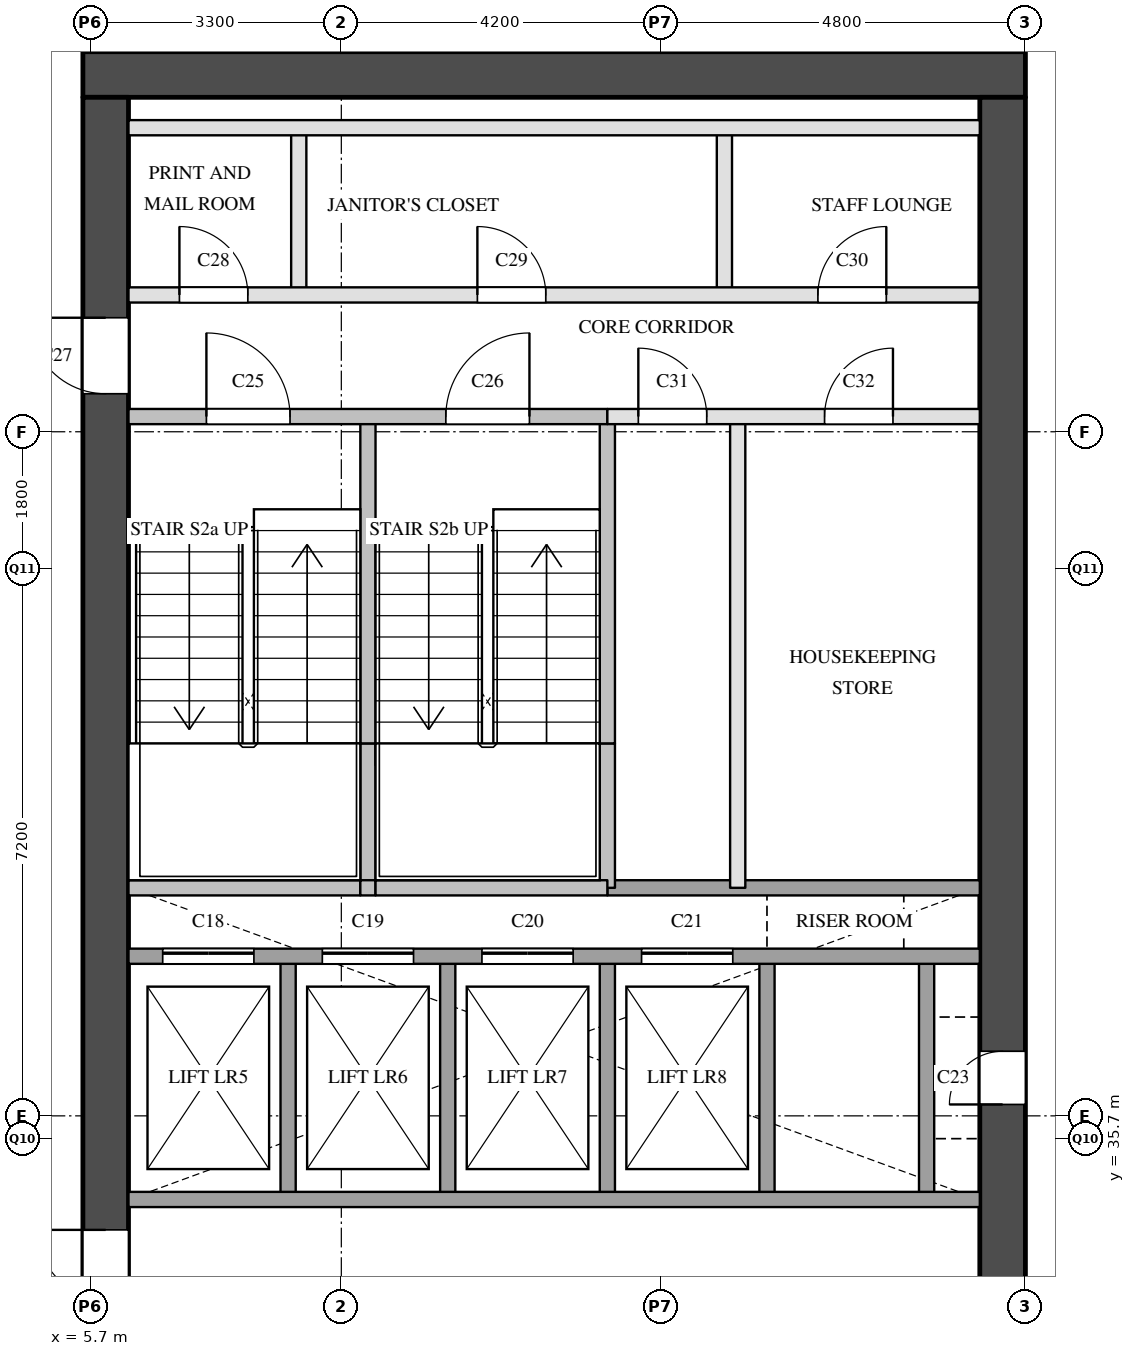
"""IFC4 building model, lengths in metres.
Left out: names, types, materials, properties, quantities, classifications, styles, units other than length and angle.
Written with IfcOpenShell. Run it as: python <this file> out.ifc"""

import sys

from ifc_helpers import new_model, si_unit, direction, frame, frame_2d, origin, place, context, subcontext, project, spatial, rectangle, extrude, element, fill, save


model = new_model("IFC4")
c1 = context("Model", 3, precision=1e-05, world=origin(), true_north=direction((0.0, 1.0)))
c2 = subcontext(c1, "Body", "Model", "MODEL_VIEW")
j1 = project(units=[si_unit("LENGTHUNIT", "METRE"), si_unit("PLANEANGLEUNIT", "RADIAN")], contexts=[c1])
p1 = place(None, origin())
s1 = spatial("IfcSite", under=j1, at=p1, CompositionType="ELEMENT")
p2 = place(p1, origin())
s2 = spatial("IfcBuilding", under=s1, at=p2, CompositionType="ELEMENT")
p3 = place(p2, frame((0.0, 0.0, 42.4)))
s3 = spatial("IfcBuildingStorey", under=s2, at=p3, CompositionType="ELEMENT", Elevation=42.4)
p4 = place(p3, frame((5.6, 49.7, 0.0), z_axis=(0.0, 0.0, 1.0), x_axis=(1.0, 0.0, 0.0)))
e1 = element("IfcWall", 1, at=p4, inside=s3, PredefinedType="SHEAR", context=c2, shape_type="SweptSolid", body=[
    extrude(rectangle(XDim=12.4, YDim=0.6, at=frame_2d((6.2, 0.0))), origin(), (0.0, 0.0, 1.0), 3.5),
])
p5 = place(p3, frame((5.9, 29.1, 0.0), z_axis=(0.0, 0.0, 1.0), x_axis=(0.0, 1.0, 0.0)))
e2 = element("IfcWall", 2, at=p5, inside=s3, PredefinedType="SHEAR", context=c2, shape_type="SweptSolid", body=[
    extrude(rectangle(XDim=20.3, YDim=0.6, at=frame_2d((10.15, 0.0))), origin(), (0.0, 0.0, 1.0), 3.5),
])
p6 = place(p5, frame((3.6, 0.0, 0.0)))
e3 = element("IfcOpeningElement", 3, at=p6, cuts=e2, PredefinedType="OPENING", context=c2, shape_type="SweptSolid", body=[
    extrude(rectangle(XDim=1.8, YDim=2.1, at=frame_2d((0.9, 1.05))), frame((0.0, 0.31, 0.0), z_axis=(0.0, -1.0, 0.0), x_axis=(1.0, 0.0, 0.0)), (0.0, 0.0, 1.0), 0.62),
])
p7 = place(p5, frame((16.4, 0.0, 0.0)))
e4 = element("IfcOpeningElement", 4, at=p7, cuts=e2, PredefinedType="OPENING", context=c2, shape_type="SweptSolid", body=[
    extrude(rectangle(XDim=1.0, YDim=2.1, at=frame_2d((0.5, 1.05))), frame((0.0, 0.31, 0.0), z_axis=(0.0, -1.0, 0.0), x_axis=(1.0, 0.0, 0.0)), (0.0, 0.0, 1.0), 0.62),
])
p8 = place(p3, frame((17.7, 29.1, 0.0), z_axis=(0.0, 0.0, 1.0), x_axis=(0.0, 1.0, 0.0)))
e5 = element("IfcWall", 5, at=p8, inside=s3, PredefinedType="SHEAR", context=c2, shape_type="SweptSolid", body=[
    extrude(rectangle(XDim=20.3, YDim=0.6, at=frame_2d((10.15, 0.0))), origin(), (0.0, 0.0, 1.0), 3.5),
])
p9 = place(p8, frame((1.25, 0.0, 0.0)))
e6 = element("IfcOpeningElement", 6, at=p9, cuts=e5, PredefinedType="OPENING", context=c2, shape_type="SweptSolid", body=[
    extrude(rectangle(XDim=0.7, YDim=2.1, at=frame_2d((0.35, 1.05))), frame((0.0, 0.31, 0.0), z_axis=(0.0, -1.0, 0.0), x_axis=(1.0, 0.0, 0.0)), (0.0, 0.0, 1.0), 0.62),
])
p10 = place(p8, frame((7.05, 0.0, 0.0)))
e7 = element("IfcOpeningElement", 7, at=p10, cuts=e5, PredefinedType="OPENING", context=c2, shape_type="SweptSolid", body=[
    extrude(rectangle(XDim=0.7, YDim=2.1, at=frame_2d((0.35, 1.05))), frame((0.0, 0.31, 0.0), z_axis=(0.0, -1.0, 0.0), x_axis=(1.0, 0.0, 0.0)), (0.0, 0.0, 1.0), 0.62),
])
p11 = place(p3, frame((8.3, 34.9, 0.0), z_axis=(0.0, 0.0, 1.0), x_axis=(0.0, 1.0, 0.0)))
e8 = element("IfcWall", 8, at=p11, inside=s3, PredefinedType="SOLIDWALL", context=c2, shape_type="SweptSolid", body=[
    extrude(rectangle(XDim=3.2, YDim=0.2, at=frame_2d((1.6, 0.0))), origin(), (0.0, 0.0, 1.0), 3.5),
])
p12 = place(p3, frame((8.44, 46.8, 0.0), z_axis=(0.0, 0.0, 1.0), x_axis=(0.0, 1.0, 0.0)))
e9 = element("IfcWall", 9, at=p12, inside=s3, PredefinedType="PARTITIONING", context=c2, shape_type="SweptSolid", body=[
    extrude(rectangle(XDim=2.2, YDim=0.2, at=frame_2d((1.1, 0.0))), origin(), (0.0, 0.0, 1.0), 3.5),
])
p13 = place(p3, frame((9.35, 39.0, 0.0), z_axis=(0.0, 0.0, 1.0), x_axis=(0.0, 1.0, 0.0)))
e10 = element("IfcWall", 10, at=p13, inside=s3, PredefinedType="SOLIDWALL", context=c2, shape_type="SweptSolid", body=[
    extrude(rectangle(XDim=1.9, YDim=0.2, at=frame_2d((0.95, 0.0))), origin(), (0.0, 0.0, 1.0), 3.5),
])
p14 = place(p3, frame((9.35, 40.9, 0.0), z_axis=(0.0, 0.0, 1.0), x_axis=(0.0, 1.0, 0.0)))
e11 = element("IfcWall", 11, at=p14, inside=s3, PredefinedType="SOLIDWALL", context=c2, shape_type="SweptSolid", body=[
    extrude(rectangle(XDim=4.3, YDim=0.2, at=frame_2d((2.15, 0.0))), origin(), (0.0, 0.0, 1.0), 3.5),
])
for number, where, z_axis, x_axis in (
    (12, (10.4, 34.9, 0.0), (0.0, 0.0, 1.0), (0.0, 1.0, 0.0)),
    (13, (12.5, 34.9, 0.0), (0.0, 0.0, 1.0), (0.0, 1.0, 0.0)),
):
    element("IfcWall", number, at=place(p3, frame(where, z_axis=z_axis, x_axis=x_axis)), inside=s3, PredefinedType="SOLIDWALL", context=c2, shape_type="SweptSolid", body=[
        extrude(rectangle(XDim=3.2, YDim=0.2, at=frame_2d((1.6, 0.0))), origin(), (0.0, 0.0, 1.0), 3.5),
    ])
p15 = place(p3, frame((12.5, 39.0, 0.0), z_axis=(0.0, 0.0, 1.0), x_axis=(0.0, 1.0, 0.0)))
e14 = element("IfcWall", 14, at=p15, inside=s3, PredefinedType="SOLIDWALL", context=c2, shape_type="SweptSolid", body=[
    extrude(rectangle(XDim=1.9, YDim=0.2, at=frame_2d((0.95, 0.0))), origin(), (0.0, 0.0, 1.0), 3.5),
])
p16 = place(p3, frame((12.5, 40.9, 0.0), z_axis=(0.0, 0.0, 1.0), x_axis=(0.0, 1.0, 0.0)))
e15 = element("IfcWall", 15, at=p16, inside=s3, PredefinedType="SOLIDWALL", context=c2, shape_type="SweptSolid", body=[
    extrude(rectangle(XDim=4.3, YDim=0.2, at=frame_2d((2.15, 0.0))), origin(), (0.0, 0.0, 1.0), 3.5),
])
p17 = place(p3, frame((14.04, 46.8, 0.0), z_axis=(0.0, 0.0, 1.0), x_axis=(0.0, 1.0, 0.0)))
e16 = element("IfcWall", 16, at=p17, inside=s3, PredefinedType="PARTITIONING", context=c2, shape_type="SweptSolid", body=[
    extrude(rectangle(XDim=2.2, YDim=0.2, at=frame_2d((1.1, 0.0))), origin(), (0.0, 0.0, 1.0), 3.5),
])
p18 = place(p3, frame((14.215, 39.0, 0.0), z_axis=(0.0, 0.0, 1.0), x_axis=(0.0, 1.0, 0.0)))
e17 = element("IfcWall", 17, at=p18, inside=s3, PredefinedType="PARTITIONING", context=c2, shape_type="SweptSolid", body=[
    extrude(rectangle(XDim=6.2, YDim=0.2, at=frame_2d((3.1, 0.0))), origin(), (0.0, 0.0, 1.0), 3.5),
])
for number, where, z_axis, x_axis in (
    (18, (14.6, 34.9, 0.0), (0.0, 0.0, 1.0), (0.0, 1.0, 0.0)),
    (19, (16.7, 34.9, 0.0), (0.0, 0.0, 1.0), (0.0, 1.0, 0.0)),
):
    element("IfcWall", number, at=place(p3, frame(where, z_axis=z_axis, x_axis=x_axis)), inside=s3, PredefinedType="SOLIDWALL", context=c2, shape_type="SweptSolid", body=[
        extrude(rectangle(XDim=3.2, YDim=0.2, at=frame_2d((1.6, 0.0))), origin(), (0.0, 0.0, 1.0), 3.5),
    ])
p19 = place(p3, frame((6.2, 34.9, 0.0), z_axis=(0.0, 0.0, 1.0), x_axis=(1.0, 0.0, 0.0)))
e20 = element("IfcWall", 20, at=p19, inside=s3, PredefinedType="SOLIDWALL", context=c2, shape_type="SweptSolid", body=[
    extrude(rectangle(XDim=11.2, YDim=0.2, at=frame_2d((5.6, 0.0))), origin(), (0.0, 0.0, 1.0), 3.5),
])
p20 = place(p3, frame((6.2, 38.1, 0.0), z_axis=(0.0, 0.0, 1.0), x_axis=(1.0, 0.0, 0.0)))
e21 = element("IfcWall", 21, at=p20, inside=s3, PredefinedType="SOLIDWALL", context=c2, shape_type="SweptSolid", body=[
    extrude(rectangle(XDim=11.2, YDim=0.2, at=frame_2d((5.6, 0.0))), origin(), (0.0, 0.0, 1.0), 3.5),
])
p21 = place(p20, frame((0.45, 0.0, 0.0)))
e22 = element("IfcOpeningElement", 22, at=p21, cuts=e21, PredefinedType="OPENING", context=c2, shape_type="SweptSolid", body=[
    extrude(rectangle(XDim=1.2, YDim=2.1, at=frame_2d((0.6, 1.05))), frame((0.0, 0.11, 0.0), z_axis=(0.0, -1.0, 0.0), x_axis=(1.0, 0.0, 0.0)), (0.0, 0.0, 1.0), 0.22),
])
p22 = place(p20, frame((2.55, 0.0, 0.0)))
e23 = element("IfcOpeningElement", 23, at=p22, cuts=e21, PredefinedType="OPENING", context=c2, shape_type="SweptSolid", body=[
    extrude(rectangle(XDim=1.2, YDim=2.1, at=frame_2d((0.6, 1.05))), frame((0.0, 0.11, 0.0), z_axis=(0.0, -1.0, 0.0), x_axis=(1.0, 0.0, 0.0)), (0.0, 0.0, 1.0), 0.22),
])
p23 = place(p20, frame((4.65, 0.0, 0.0)))
e24 = element("IfcOpeningElement", 24, at=p23, cuts=e21, PredefinedType="OPENING", context=c2, shape_type="SweptSolid", body=[
    extrude(rectangle(XDim=1.2, YDim=2.1, at=frame_2d((0.6, 1.05))), frame((0.0, 0.11, 0.0), z_axis=(0.0, -1.0, 0.0), x_axis=(1.0, 0.0, 0.0)), (0.0, 0.0, 1.0), 0.22),
])
p24 = place(p20, frame((6.75, 0.0, 0.0)))
e25 = element("IfcOpeningElement", 25, at=p24, cuts=e21, PredefinedType="OPENING", context=c2, shape_type="SweptSolid", body=[
    extrude(rectangle(XDim=1.2, YDim=2.1, at=frame_2d((0.6, 1.05))), frame((0.0, 0.11, 0.0), z_axis=(0.0, -1.0, 0.0), x_axis=(1.0, 0.0, 0.0)), (0.0, 0.0, 1.0), 0.22),
])
p25 = place(p3, frame((12.5, 39.0, 0.0), z_axis=(0.0, 0.0, 1.0), x_axis=(1.0, 0.0, 0.0)))
e26 = element("IfcWall", 26, at=p25, inside=s3, PredefinedType="SOLIDWALL", context=c2, shape_type="SweptSolid", body=[
    extrude(rectangle(XDim=4.9, YDim=0.2, at=frame_2d((2.45, 0.0))), origin(), (0.0, 0.0, 1.0), 3.5),
])
p26 = place(p3, frame((6.2, 39.0, 0.0), z_axis=(0.0, 0.0, 1.0), x_axis=(1.0, 0.0, 0.0)))
e27 = element("IfcWall", 27, at=p26, inside=s3, PredefinedType="SOLIDWALL", context=c2, shape_type="SweptSolid", body=[
    extrude(rectangle(XDim=3.05, YDim=0.2, at=frame_2d((1.525, 0.0))), origin(), (0.0, 0.0, 1.0), 3.5),
])
p27 = place(p3, frame((9.25, 39.0, 0.0), z_axis=(0.0, 0.0, 1.0), x_axis=(1.0, 0.0, 0.0)))
e28 = element("IfcWall", 28, at=p27, inside=s3, PredefinedType="SOLIDWALL", context=c2, shape_type="SweptSolid", body=[
    extrude(rectangle(XDim=0.2, YDim=0.2, at=frame_2d((0.1, 0.0))), origin(), (0.0, 0.0, 1.0), 3.5),
])
p28 = place(p3, frame((9.45, 39.0, 0.0), z_axis=(0.0, 0.0, 1.0), x_axis=(1.0, 0.0, 0.0)))
e29 = element("IfcWall", 29, at=p28, inside=s3, PredefinedType="SOLIDWALL", context=c2, shape_type="SweptSolid", body=[
    extrude(rectangle(XDim=3.05, YDim=0.2, at=frame_2d((1.525, 0.0))), origin(), (0.0, 0.0, 1.0), 3.5),
])
p29 = place(p3, frame((12.5, 45.2, 0.0), z_axis=(0.0, 0.0, 1.0), x_axis=(1.0, 0.0, 0.0)))
e30 = element("IfcWall", 30, at=p29, inside=s3, PredefinedType="PARTITIONING", context=c2, shape_type="SweptSolid", body=[
    extrude(rectangle(XDim=4.9, YDim=0.2, at=frame_2d((2.45, 0.0))), origin(), (0.0, 0.0, 1.0), 3.5),
])
p30 = place(p29, frame((0.407, 0.0, 0.0)))
e31 = element("IfcOpeningElement", 31, at=p30, cuts=e30, PredefinedType="OPENING", context=c2, shape_type="SweptSolid", body=[
    extrude(rectangle(XDim=0.9, YDim=2.1, at=frame_2d((0.45, 1.05))), frame((0.0, 0.11, 0.0), z_axis=(0.0, -1.0, 0.0), x_axis=(1.0, 0.0, 0.0)), (0.0, 0.0, 1.0), 0.22),
])
p31 = place(p29, frame((2.857, 0.0, 0.0)))
e32 = element("IfcOpeningElement", 32, at=p31, cuts=e30, PredefinedType="OPENING", context=c2, shape_type="SweptSolid", body=[
    extrude(rectangle(XDim=0.9, YDim=2.1, at=frame_2d((0.45, 1.05))), frame((0.0, 0.11, 0.0), z_axis=(0.0, -1.0, 0.0), x_axis=(1.0, 0.0, 0.0)), (0.0, 0.0, 1.0), 0.22),
])
p32 = place(p3, frame((6.2, 45.2, 0.0), z_axis=(0.0, 0.0, 1.0), x_axis=(1.0, 0.0, 0.0)))
e33 = element("IfcWall", 33, at=p32, inside=s3, PredefinedType="SOLIDWALL", context=c2, shape_type="SweptSolid", body=[
    extrude(rectangle(XDim=6.3, YDim=0.2, at=frame_2d((3.15, 0.0))), origin(), (0.0, 0.0, 1.0), 3.5),
])
p33 = place(p32, frame((1.025, 0.0, 0.0)))
e34 = element("IfcOpeningElement", 34, at=p33, cuts=e33, PredefinedType="OPENING", context=c2, shape_type="SweptSolid", body=[
    extrude(rectangle(XDim=1.1, YDim=2.1, at=frame_2d((0.55, 1.05))), frame((0.0, 0.11, 0.0), z_axis=(0.0, -1.0, 0.0), x_axis=(1.0, 0.0, 0.0)), (0.0, 0.0, 1.0), 0.22),
])
p34 = place(p32, frame((4.175, 0.0, 0.0)))
e35 = element("IfcOpeningElement", 35, at=p34, cuts=e33, PredefinedType="OPENING", context=c2, shape_type="SweptSolid", body=[
    extrude(rectangle(XDim=1.1, YDim=2.1, at=frame_2d((0.55, 1.05))), frame((0.0, 0.11, 0.0), z_axis=(0.0, -1.0, 0.0), x_axis=(1.0, 0.0, 0.0)), (0.0, 0.0, 1.0), 0.22),
])
p35 = place(p3, frame((6.2, 46.8, 0.0), z_axis=(0.0, 0.0, 1.0), x_axis=(1.0, 0.0, 0.0)))
e36 = element("IfcWall", 36, at=p35, inside=s3, PredefinedType="PARTITIONING", context=c2, shape_type="SweptSolid", body=[
    extrude(rectangle(XDim=11.2, YDim=0.2, at=frame_2d((5.6, 0.0))), origin(), (0.0, 0.0, 1.0), 3.5),
])
p36 = place(p35, frame((0.67, 0.0, 0.0)))
e37 = element("IfcOpeningElement", 37, at=p36, cuts=e36, PredefinedType="OPENING", context=c2, shape_type="SweptSolid", body=[
    extrude(rectangle(XDim=0.9, YDim=2.1, at=frame_2d((0.45, 1.05))), frame((0.0, 0.11, 0.0), z_axis=(0.0, -1.0, 0.0), x_axis=(1.0, 0.0, 0.0)), (0.0, 0.0, 1.0), 0.22),
])
p37 = place(p35, frame((4.59, 0.0, 0.0)))
e38 = element("IfcOpeningElement", 38, at=p37, cuts=e36, PredefinedType="OPENING", context=c2, shape_type="SweptSolid", body=[
    extrude(rectangle(XDim=0.9, YDim=2.1, at=frame_2d((0.45, 1.05))), frame((0.0, 0.11, 0.0), z_axis=(0.0, -1.0, 0.0), x_axis=(1.0, 0.0, 0.0)), (0.0, 0.0, 1.0), 0.22),
])
p38 = place(p35, frame((9.07, 0.0, 0.0)))
e39 = element("IfcOpeningElement", 39, at=p38, cuts=e36, PredefinedType="OPENING", context=c2, shape_type="SweptSolid", body=[
    extrude(rectangle(XDim=0.9, YDim=2.1, at=frame_2d((0.45, 1.05))), frame((0.0, 0.11, 0.0), z_axis=(0.0, -1.0, 0.0), x_axis=(1.0, 0.0, 0.0)), (0.0, 0.0, 1.0), 0.22),
])
p39 = place(p3, frame((6.2, 49.0, 0.0), z_axis=(0.0, 0.0, 1.0), x_axis=(1.0, 0.0, 0.0)))
e40 = element("IfcWall", 40, at=p39, inside=s3, PredefinedType="PARTITIONING", context=c2, shape_type="SweptSolid", body=[
    extrude(rectangle(XDim=11.2, YDim=0.2, at=frame_2d((5.6, 0.0))), origin(), (0.0, 0.0, 1.0), 3.5),
])
p40 = place(p21, origin())
e41 = element("IfcDoor", 41, at=p40, inside=s3, OperationType="SLIDING_TO_LEFT", PredefinedType="DOOR", context=c2, shape_type="SweptSolid", body=[
    extrude(rectangle(XDim=1.2, YDim=2.1, at=frame_2d((0.6, 1.05))), frame((0.0, 0.025, 0.0), z_axis=(0.0, -1.0, 0.0), x_axis=(1.0, 0.0, 0.0)), (0.0, 0.0, 1.0), 0.05),
])
fill(e22, e41)
p41 = place(p22, origin())
e42 = element("IfcDoor", 42, at=p41, inside=s3, OperationType="SLIDING_TO_LEFT", PredefinedType="DOOR", context=c2, shape_type="SweptSolid", body=[
    extrude(rectangle(XDim=1.2, YDim=2.1, at=frame_2d((0.6, 1.05))), frame((0.0, 0.025, 0.0), z_axis=(0.0, -1.0, 0.0), x_axis=(1.0, 0.0, 0.0)), (0.0, 0.0, 1.0), 0.05),
])
fill(e23, e42)
p42 = place(p23, origin())
e43 = element("IfcDoor", 43, at=p42, inside=s3, OperationType="SLIDING_TO_LEFT", PredefinedType="DOOR", context=c2, shape_type="SweptSolid", body=[
    extrude(rectangle(XDim=1.2, YDim=2.1, at=frame_2d((0.6, 1.05))), frame((0.0, 0.025, 0.0), z_axis=(0.0, -1.0, 0.0), x_axis=(1.0, 0.0, 0.0)), (0.0, 0.0, 1.0), 0.05),
])
fill(e24, e43)
p43 = place(p24, origin())
e44 = element("IfcDoor", 44, at=p43, inside=s3, OperationType="SLIDING_TO_LEFT", PredefinedType="DOOR", context=c2, shape_type="SweptSolid", body=[
    extrude(rectangle(XDim=1.2, YDim=2.1, at=frame_2d((0.6, 1.05))), frame((0.0, 0.025, 0.0), z_axis=(0.0, -1.0, 0.0), x_axis=(1.0, 0.0, 0.0)), (0.0, 0.0, 1.0), 0.05),
])
fill(e25, e44)
p44 = place(p10, origin())
e45 = element("IfcDoor", 45, at=p44, inside=s3, OperationType="SINGLE_SWING_LEFT", PredefinedType="DOOR", context=c2, shape_type="SweptSolid", body=[
    extrude(rectangle(XDim=0.7, YDim=2.1, at=frame_2d((0.35, 1.05))), frame((0.0, 0.025, 0.0), z_axis=(0.0, -1.0, 0.0), x_axis=(1.0, 0.0, 0.0)), (0.0, 0.0, 1.0), 0.05),
])
fill(e7, e45)
p45 = place(p6, origin())
e46 = element("IfcDoor", 46, at=p45, inside=s3, OperationType="DOUBLE_DOOR_SINGLE_SWING", PredefinedType="DOOR", context=c2, shape_type="SweptSolid", body=[
    extrude(rectangle(XDim=1.8, YDim=2.1, at=frame_2d((0.9, 1.05))), frame((0.0, 0.025, 0.0), z_axis=(0.0, -1.0, 0.0), x_axis=(1.0, 0.0, 0.0)), (0.0, 0.0, 1.0), 0.05),
])
fill(e3, e46)
p46 = place(p33, origin())
e47 = element("IfcDoor", 47, at=p46, inside=s3, OperationType="SINGLE_SWING_LEFT", PredefinedType="DOOR", context=c2, shape_type="SweptSolid", body=[
    extrude(rectangle(XDim=1.1, YDim=2.1, at=frame_2d((0.55, 1.05))), frame((0.0, 0.025, 0.0), z_axis=(0.0, -1.0, 0.0), x_axis=(1.0, 0.0, 0.0)), (0.0, 0.0, 1.0), 0.05),
])
fill(e34, e47)
p47 = place(p34, origin())
e48 = element("IfcDoor", 48, at=p47, inside=s3, OperationType="SINGLE_SWING_RIGHT", PredefinedType="DOOR", context=c2, shape_type="SweptSolid", body=[
    extrude(rectangle(XDim=1.1, YDim=2.1, at=frame_2d((0.55, 1.05))), frame((0.0, 0.025, 0.0), z_axis=(0.0, -1.0, 0.0), x_axis=(1.0, 0.0, 0.0)), (0.0, 0.0, 1.0), 0.05),
])
fill(e35, e48)
p48 = place(p7, origin())
e49 = element("IfcDoor", 49, at=p48, inside=s3, OperationType="SINGLE_SWING_RIGHT", PredefinedType="DOOR", context=c2, shape_type="SweptSolid", body=[
    extrude(rectangle(XDim=1.0, YDim=2.1, at=frame_2d((0.5, 1.05))), frame((0.0, 0.025, 0.0), z_axis=(0.0, -1.0, 0.0), x_axis=(1.0, 0.0, 0.0)), (0.0, 0.0, 1.0), 0.05),
])
fill(e4, e49)
p49 = place(p36, origin())
e50 = element("IfcDoor", 50, at=p49, inside=s3, OperationType="SINGLE_SWING_LEFT", PredefinedType="DOOR", context=c2, shape_type="SweptSolid", body=[
    extrude(rectangle(XDim=0.9, YDim=2.1, at=frame_2d((0.45, 1.05))), frame((0.0, 0.025, 0.0), z_axis=(0.0, -1.0, 0.0), x_axis=(1.0, 0.0, 0.0)), (0.0, 0.0, 1.0), 0.05),
])
fill(e37, e50)
p50 = place(p37, origin())
e51 = element("IfcDoor", 51, at=p50, inside=s3, OperationType="SINGLE_SWING_LEFT", PredefinedType="DOOR", context=c2, shape_type="SweptSolid", body=[
    extrude(rectangle(XDim=0.9, YDim=2.1, at=frame_2d((0.45, 1.05))), frame((0.0, 0.025, 0.0), z_axis=(0.0, -1.0, 0.0), x_axis=(1.0, 0.0, 0.0)), (0.0, 0.0, 1.0), 0.05),
])
fill(e38, e51)
p51 = place(p38, origin())
e52 = element("IfcDoor", 52, at=p51, inside=s3, OperationType="SINGLE_SWING_RIGHT", PredefinedType="DOOR", context=c2, shape_type="SweptSolid", body=[
    extrude(rectangle(XDim=0.9, YDim=2.1, at=frame_2d((0.45, 1.05))), frame((0.0, 0.025, 0.0), z_axis=(0.0, -1.0, 0.0), x_axis=(1.0, 0.0, 0.0)), (0.0, 0.0, 1.0), 0.05),
])
fill(e39, e52)
p52 = place(p30, origin())
e53 = element("IfcDoor", 53, at=p52, inside=s3, OperationType="SINGLE_SWING_LEFT", PredefinedType="DOOR", context=c2, shape_type="SweptSolid", body=[
    extrude(rectangle(XDim=0.9, YDim=2.1, at=frame_2d((0.45, 1.05))), frame((0.0, 0.025, 0.0), z_axis=(0.0, -1.0, 0.0), x_axis=(1.0, 0.0, 0.0)), (0.0, 0.0, 1.0), 0.05),
])
fill(e31, e53)
p53 = place(p31, origin())
e54 = element("IfcDoor", 54, at=p53, inside=s3, OperationType="SINGLE_SWING_RIGHT", PredefinedType="DOOR", context=c2, shape_type="SweptSolid", body=[
    extrude(rectangle(XDim=0.9, YDim=2.1, at=frame_2d((0.45, 1.05))), frame((0.0, 0.025, 0.0), z_axis=(0.0, -1.0, 0.0), x_axis=(1.0, 0.0, 0.0)), (0.0, 0.0, 1.0), 0.05),
])
fill(e32, e54)
save(model, sys.argv[1])
